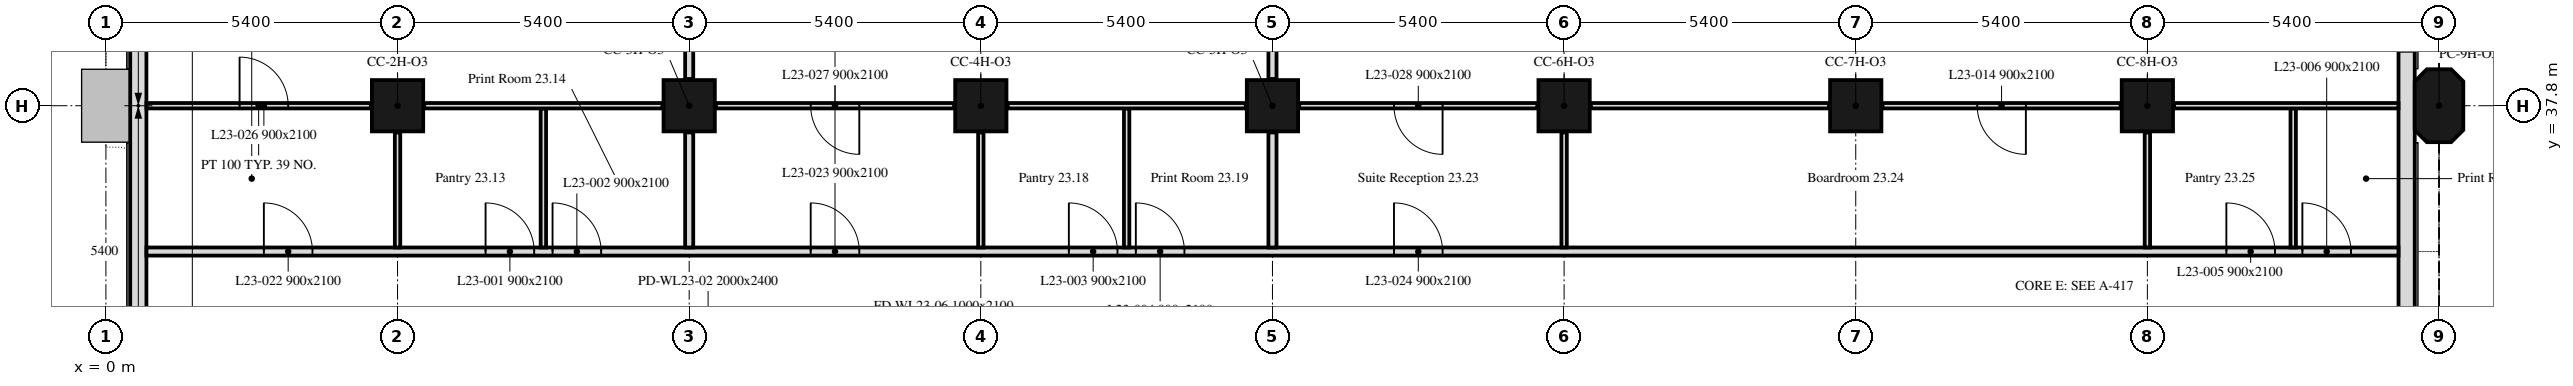
"""IFC4 building model, lengths in metres.
Left out: names, types, materials, properties, quantities, classifications, styles, units other than length and angle.
Written with IfcOpenShell. Run it as: python <this file> out.ifc"""

import sys

from ifc_helpers import new_model, si_unit, direction, frame, frame_2d, origin, origin_2d, place, context, subcontext, project, spatial, polyline, rectangle, outline, extrude, element, fill, save


model = new_model("IFC4")
c1 = context("Model", 3, precision=1e-05, world=origin(), true_north=direction((0.0, 1.0)))
c2 = subcontext(c1, "Body", "Model", "MODEL_VIEW")
j1 = project(units=[si_unit("LENGTHUNIT", "METRE"), si_unit("PLANEANGLEUNIT", "RADIAN")], contexts=[c1])
p1 = place(None, origin())
s1 = spatial("IfcSite", under=j1, at=p1, CompositionType="ELEMENT")
p2 = place(p1, origin())
s2 = spatial("IfcBuilding", under=s1, at=p2, CompositionType="ELEMENT")
p3 = place(p2, frame((0.0, 0.0, 99.2)))
s3 = spatial("IfcBuildingStorey", under=s2, at=p3, CompositionType="ELEMENT", Elevation=99.2)
for number, where, z_axis, x_axis in (
    (1, (5.4, 37.8, 0.0), (0.0, 0.0, 1.0), (1.0, 0.0, 0.0)),
    (2, (10.8, 37.8, 0.0), (0.0, 0.0, 1.0), (1.0, 0.0, 0.0)),
    (3, (16.2, 37.8, 0.0), (0.0, 0.0, 1.0), (1.0, 0.0, 0.0)),
    (4, (21.6, 37.8, 0.0), (0.0, 0.0, 1.0), (1.0, 0.0, 0.0)),
    (5, (27.0, 37.8, 0.0), (0.0, 0.0, 1.0), (1.0, 0.0, 0.0)),
    (6, (32.4, 37.8, 0.0), (0.0, 0.0, 1.0), (1.0, 0.0, 0.0)),
    (7, (37.8, 37.8, 0.0), (0.0, 0.0, 1.0), (1.0, 0.0, 0.0)),
):
    element("IfcColumn", number, at=place(p3, frame(where, z_axis=z_axis, x_axis=x_axis)), inside=s3, PredefinedType="COLUMN", context=c2, shape_type="SweptSolid", body=[
        extrude(rectangle(XDim=0.95, YDim=0.95, at=origin_2d()), origin(), (0.0, 0.0, 1.0), 3.5),
    ])
p4 = place(p3, frame((43.2, 37.8, 0.0), z_axis=(0.0, 0.0, 1.0), x_axis=(0.0, 1.0, 0.0)))
e8 = element("IfcColumn", 8, at=p4, inside=s3, PredefinedType="COLUMN", context=c2, shape_type="SweptSolid", body=[
    extrude(outline(polyline([(-0.45, -0.45), (0.45, -0.45), (0.675, -0.225), (0.675, 0.225), (0.45, 0.45), (-0.45, 0.45), (-0.675, 0.225), (-0.675, -0.225), (-0.45, -0.45)])), origin(), (0.0, 0.0, 1.0), 3.5),
])
p5 = place(p3, frame((42.6, 32.4, 0.0), z_axis=(0.0, 0.0, 1.0), x_axis=(0.0, 1.0, 0.0)))
e9 = element("IfcWall", 9, at=p5, inside=s3, PredefinedType="SOLIDWALL", context=c2, shape_type="SweptSolid", body=[
    extrude(rectangle(XDim=10.614, YDim=0.3, at=frame_2d((5.307, 0.0))), origin(), (0.0, 0.0, 1.0), 3.5),
])
p6 = place(p5, frame((6.4, 0.0, 0.9)))
e10 = element("IfcOpeningElement", 10, at=p6, cuts=e9, PredefinedType="OPENING", context=c2, shape_type="SweptSolid", body=[
    extrude(rectangle(XDim=3.4, YDim=1.7, at=frame_2d((1.7, 0.85))), frame((0.0, 0.16, 0.0), z_axis=(0.0, -1.0, 0.0), x_axis=(1.0, 0.0, 0.0)), (0.0, 0.0, 1.0), 0.32),
])
p7 = place(p3, frame((0.6, 43.014, 0.0), z_axis=(0.0, 0.0, 1.0), x_axis=(0.0, -1.0, 0.0)))
e11 = element("IfcWall", 11, at=p7, inside=s3, PredefinedType="SOLIDWALL", context=c2, shape_type="SweptSolid", body=[
    extrude(rectangle(XDim=32.027, YDim=0.3, at=frame_2d((16.014, 0.0))), origin(), (0.0, 0.0, 1.0), 3.5),
])
p8 = place(p7, frame((28.164, 0.0, 0.9)))
e12 = element("IfcOpeningElement", 12, at=p8, cuts=e11, PredefinedType="OPENING", context=c2, shape_type="SweptSolid", body=[
    extrude(rectangle(XDim=1.1, YDim=1.7, at=frame_2d((0.55, 0.85))), frame((0.0, 0.16, 0.0), z_axis=(0.0, -1.0, 0.0), x_axis=(1.0, 0.0, 0.0)), (0.0, 0.0, 1.0), 0.32),
])
p9 = place(p7, frame((29.764, 0.0, 0.9)))
e13 = element("IfcOpeningElement", 13, at=p9, cuts=e11, PredefinedType="OPENING", context=c2, shape_type="SweptSolid", body=[
    extrude(rectangle(XDim=1.1, YDim=1.7, at=frame_2d((0.55, 0.85))), frame((0.0, 0.16, 0.0), z_axis=(0.0, -1.0, 0.0), x_axis=(1.0, 0.0, 0.0)), (0.0, 0.0, 1.0), 0.32),
])
p10 = place(p3, frame((0.751, 35.1, 0.0), z_axis=(0.0, 0.0, 1.0), x_axis=(1.0, 0.0, 0.0)))
e14 = element("IfcWall", 14, at=p10, inside=s3, PredefinedType="PARTITIONING", context=c2, shape_type="SweptSolid", body=[
    extrude(rectangle(XDim=41.698, YDim=0.15, at=frame_2d((20.849, 0.0))), origin(), (0.0, 0.0, 1.0), 2.75),
])
p11 = place(p10, frame((6.279, 0.0, 0.0)))
e15 = element("IfcOpeningElement", 15, at=p11, cuts=e14, PredefinedType="OPENING", context=c2, shape_type="SweptSolid", body=[
    extrude(rectangle(XDim=0.9, YDim=2.1, at=frame_2d((0.45, 1.05))), frame((0.0, 0.075, 0.0), z_axis=(0.0, -1.0, 0.0), x_axis=(1.0, 0.0, 0.0)), (0.0, 0.0, 1.0), 0.15),
])
p12 = place(p10, frame((7.519, 0.0, 0.0)))
e16 = element("IfcOpeningElement", 16, at=p12, cuts=e14, PredefinedType="OPENING", context=c2, shape_type="SweptSolid", body=[
    extrude(rectangle(XDim=0.9, YDim=2.1, at=frame_2d((0.45, 1.05))), frame((0.0, 0.075, 0.0), z_axis=(0.0, -1.0, 0.0), x_axis=(1.0, 0.0, 0.0)), (0.0, 0.0, 1.0), 0.15),
])
p13 = place(p10, frame((17.079, 0.0, 0.0)))
e17 = element("IfcOpeningElement", 17, at=p13, cuts=e14, PredefinedType="OPENING", context=c2, shape_type="SweptSolid", body=[
    extrude(rectangle(XDim=0.9, YDim=2.1, at=frame_2d((0.45, 1.05))), frame((0.0, 0.075, 0.0), z_axis=(0.0, -1.0, 0.0), x_axis=(1.0, 0.0, 0.0)), (0.0, 0.0, 1.0), 0.15),
])
p14 = place(p10, frame((18.319, 0.0, 0.0)))
e18 = element("IfcOpeningElement", 18, at=p14, cuts=e14, PredefinedType="OPENING", context=c2, shape_type="SweptSolid", body=[
    extrude(rectangle(XDim=0.9, YDim=2.1, at=frame_2d((0.45, 1.05))), frame((0.0, 0.075, 0.0), z_axis=(0.0, -1.0, 0.0), x_axis=(1.0, 0.0, 0.0)), (0.0, 0.0, 1.0), 0.15),
])
p15 = place(p10, frame((38.511, 0.0, 0.0)))
e19 = element("IfcOpeningElement", 19, at=p15, cuts=e14, PredefinedType="OPENING", context=c2, shape_type="SweptSolid", body=[
    extrude(rectangle(XDim=0.9, YDim=2.1, at=frame_2d((0.45, 1.05))), frame((0.0, 0.075, 0.0), z_axis=(0.0, -1.0, 0.0), x_axis=(1.0, 0.0, 0.0)), (0.0, 0.0, 1.0), 0.15),
])
p16 = place(p10, frame((39.919, 0.0, 0.0)))
e20 = element("IfcOpeningElement", 20, at=p16, cuts=e14, PredefinedType="OPENING", context=c2, shape_type="SweptSolid", body=[
    extrude(rectangle(XDim=0.9, YDim=2.1, at=frame_2d((0.45, 1.05))), frame((0.0, 0.075, 0.0), z_axis=(0.0, -1.0, 0.0), x_axis=(1.0, 0.0, 0.0)), (0.0, 0.0, 1.0), 0.15),
])
p17 = place(p10, frame((2.174, 0.0, 0.0)))
e21 = element("IfcOpeningElement", 21, at=p17, cuts=e14, PredefinedType="OPENING", context=c2, shape_type="SweptSolid", body=[
    extrude(rectangle(XDim=0.9, YDim=2.1, at=frame_2d((0.45, 1.05))), frame((0.0, 0.075, 0.0), z_axis=(0.0, -1.0, 0.0), x_axis=(1.0, 0.0, 0.0)), (0.0, 0.0, 1.0), 0.15),
])
p18 = place(p10, frame((12.299, 0.0, 0.0)))
e22 = element("IfcOpeningElement", 22, at=p18, cuts=e14, PredefinedType="OPENING", context=c2, shape_type="SweptSolid", body=[
    extrude(rectangle(XDim=0.9, YDim=2.1, at=frame_2d((0.45, 1.05))), frame((0.0, 0.075, 0.0), z_axis=(0.0, -1.0, 0.0), x_axis=(1.0, 0.0, 0.0)), (0.0, 0.0, 1.0), 0.15),
])
p19 = place(p10, frame((23.099, 0.0, 0.0)))
e23 = element("IfcOpeningElement", 23, at=p19, cuts=e14, PredefinedType="OPENING", context=c2, shape_type="SweptSolid", body=[
    extrude(rectangle(XDim=0.9, YDim=2.1, at=frame_2d((0.45, 1.05))), frame((0.0, 0.075, 0.0), z_axis=(0.0, -1.0, 0.0), x_axis=(1.0, 0.0, 0.0)), (0.0, 0.0, 1.0), 0.15),
])
p20 = place(p3, frame((0.751, 37.8, 0.0), z_axis=(0.0, 0.0, 1.0), x_axis=(1.0, 0.0, 0.0)))
e24 = element("IfcWall", 24, at=p20, inside=s3, PredefinedType="PARTITIONING", context=c2, shape_type="SweptSolid", body=[
    extrude(rectangle(XDim=4.154, YDim=0.1, at=frame_2d((2.077, 0.0))), origin(), (0.0, 0.0, 1.0), 2.75),
])
p21 = place(p20, frame((1.724, 0.0, 0.0)))
e25 = element("IfcOpeningElement", 25, at=p21, cuts=e24, PredefinedType="OPENING", context=c2, shape_type="SweptSolid", body=[
    extrude(rectangle(XDim=0.9, YDim=2.1, at=frame_2d((0.45, 1.05))), frame((0.0, 0.05, 0.0), z_axis=(0.0, -1.0, 0.0), x_axis=(1.0, 0.0, 0.0)), (0.0, 0.0, 1.0), 0.1),
])
p22 = place(p3, frame((5.4, 37.305, 0.0), z_axis=(0.0, 0.0, 1.0), x_axis=(0.0, -1.0, 0.0)))
e26 = element("IfcWall", 26, at=p22, inside=s3, PredefinedType="PARTITIONING", context=c2, shape_type="SweptSolid", body=[
    extrude(rectangle(XDim=2.13, YDim=0.1, at=frame_2d((1.065, 0.0))), origin(), (0.0, 0.0, 1.0), 3.5),
])
p23 = place(p3, frame((8.1, 35.175, 0.0), z_axis=(0.0, 0.0, 1.0), x_axis=(0.0, 1.0, 0.0)))
e27 = element("IfcWall", 27, at=p23, inside=s3, PredefinedType="PARTITIONING", context=c2, shape_type="SweptSolid", body=[
    extrude(rectangle(XDim=2.575, YDim=0.1, at=frame_2d((1.288, 0.0))), origin(), (0.0, 0.0, 1.0), 3.5),
])
p24 = place(p3, frame((10.8, 35.175, 0.0), z_axis=(0.0, 0.0, 1.0), x_axis=(0.0, 1.0, 0.0)))
e28 = element("IfcWall", 28, at=p24, inside=s3, PredefinedType="PARTITIONING", context=c2, shape_type="SweptSolid", body=[
    extrude(rectangle(XDim=2.13, YDim=0.15, at=frame_2d((1.065, 0.0))), origin(), (0.0, 0.0, 1.0), 2.75),
])
p25 = place(p3, frame((10.305, 37.8, 0.0), z_axis=(0.0, 0.0, 1.0), x_axis=(-1.0, 0.0, 0.0)))
e29 = element("IfcWall", 29, at=p25, inside=s3, PredefinedType="PARTITIONING", context=c2, shape_type="SweptSolid", body=[
    extrude(rectangle(XDim=4.41, YDim=0.1, at=frame_2d((2.205, 0.0))), origin(), (0.0, 0.0, 1.0), 2.75),
])
p26 = place(p3, frame((10.8, 38.295, 0.0), z_axis=(0.0, 0.0, 1.0), x_axis=(0.0, 1.0, 0.0)))
e30 = element("IfcWall", 30, at=p26, inside=s3, PredefinedType="PARTITIONING", context=c2, shape_type="SweptSolid", body=[
    extrude(rectangle(XDim=4.41, YDim=0.15, at=frame_2d((2.205, 0.0))), origin(), (0.0, 0.0, 1.0), 2.75),
])
p27 = place(p3, frame((16.2, 35.175, 0.0), z_axis=(0.0, 0.0, 1.0), x_axis=(0.0, 1.0, 0.0)))
e31 = element("IfcWall", 31, at=p27, inside=s3, PredefinedType="PARTITIONING", context=c2, shape_type="SweptSolid", body=[
    extrude(rectangle(XDim=2.13, YDim=0.1, at=frame_2d((1.065, 0.0))), origin(), (0.0, 0.0, 1.0), 2.75),
])
p28 = place(p3, frame((15.705, 37.8, 0.0), z_axis=(0.0, 0.0, 1.0), x_axis=(-1.0, 0.0, 0.0)))
e32 = element("IfcWall", 32, at=p28, inside=s3, PredefinedType="PARTITIONING", context=c2, shape_type="SweptSolid", body=[
    extrude(rectangle(XDim=4.41, YDim=0.1, at=frame_2d((2.205, 0.0))), origin(), (0.0, 0.0, 1.0), 2.75),
])
p29 = place(p28, frame((1.755, 0.0, 0.0)))
e33 = element("IfcOpeningElement", 33, at=p29, cuts=e32, PredefinedType="OPENING", context=c2, shape_type="SweptSolid", body=[
    extrude(rectangle(XDim=0.9, YDim=2.1, at=frame_2d((0.45, 1.05))), frame((0.0, 0.05, 0.0), z_axis=(0.0, -1.0, 0.0), x_axis=(1.0, 0.0, 0.0)), (0.0, 0.0, 1.0), 0.1),
])
p30 = place(p3, frame((18.9, 35.175, 0.0), z_axis=(0.0, 0.0, 1.0), x_axis=(0.0, 1.0, 0.0)))
e34 = element("IfcWall", 34, at=p30, inside=s3, PredefinedType="PARTITIONING", context=c2, shape_type="SweptSolid", body=[
    extrude(rectangle(XDim=2.575, YDim=0.1, at=frame_2d((1.288, 0.0))), origin(), (0.0, 0.0, 1.0), 3.5),
])
p31 = place(p3, frame((21.6, 35.175, 0.0), z_axis=(0.0, 0.0, 1.0), x_axis=(0.0, 1.0, 0.0)))
e35 = element("IfcWall", 35, at=p31, inside=s3, PredefinedType="PARTITIONING", context=c2, shape_type="SweptSolid", body=[
    extrude(rectangle(XDim=2.13, YDim=0.15, at=frame_2d((1.065, 0.0))), origin(), (0.0, 0.0, 1.0), 2.75),
])
p32 = place(p3, frame((21.105, 37.8, 0.0), z_axis=(0.0, 0.0, 1.0), x_axis=(-1.0, 0.0, 0.0)))
e36 = element("IfcWall", 36, at=p32, inside=s3, PredefinedType="PARTITIONING", context=c2, shape_type="SweptSolid", body=[
    extrude(rectangle(XDim=4.41, YDim=0.1, at=frame_2d((2.205, 0.0))), origin(), (0.0, 0.0, 1.0), 3.5),
])
p33 = place(p3, frame((21.6, 38.295, 0.0), z_axis=(0.0, 0.0, 1.0), x_axis=(0.0, 1.0, 0.0)))
e37 = element("IfcWall", 37, at=p33, inside=s3, PredefinedType="PARTITIONING", context=c2, shape_type="SweptSolid", body=[
    extrude(rectangle(XDim=4.41, YDim=0.15, at=frame_2d((2.205, 0.0))), origin(), (0.0, 0.0, 1.0), 2.75),
])
p34 = place(p3, frame((27.0, 35.175, 0.0), z_axis=(0.0, 0.0, 1.0), x_axis=(0.0, 1.0, 0.0)))
e38 = element("IfcWall", 38, at=p34, inside=s3, PredefinedType="PARTITIONING", context=c2, shape_type="SweptSolid", body=[
    extrude(rectangle(XDim=2.13, YDim=0.1, at=frame_2d((1.065, 0.0))), origin(), (0.0, 0.0, 1.0), 2.75),
])
p35 = place(p3, frame((26.505, 37.8, 0.0), z_axis=(0.0, 0.0, 1.0), x_axis=(-1.0, 0.0, 0.0)))
e39 = element("IfcWall", 39, at=p35, inside=s3, PredefinedType="PARTITIONING", context=c2, shape_type="SweptSolid", body=[
    extrude(rectangle(XDim=4.41, YDim=0.1, at=frame_2d((2.205, 0.0))), origin(), (0.0, 0.0, 1.0), 3.5),
])
p36 = place(p35, frame((1.755, 0.0, 0.0)))
e40 = element("IfcOpeningElement", 40, at=p36, cuts=e39, PredefinedType="OPENING", context=c2, shape_type="SweptSolid", body=[
    extrude(rectangle(XDim=0.9, YDim=2.1, at=frame_2d((0.45, 1.05))), frame((0.0, 0.05, 0.0), z_axis=(0.0, -1.0, 0.0), x_axis=(1.0, 0.0, 0.0)), (0.0, 0.0, 1.0), 0.1),
])
p37 = place(p3, frame((37.8, 35.175, 0.0), z_axis=(0.0, 0.0, 1.0), x_axis=(0.0, 1.0, 0.0)))
e41 = element("IfcWall", 41, at=p37, inside=s3, PredefinedType="PARTITIONING", context=c2, shape_type="SweptSolid", body=[
    extrude(rectangle(XDim=2.13, YDim=0.1, at=frame_2d((1.065, 0.0))), origin(), (0.0, 0.0, 1.0), 3.5),
])
p38 = place(p3, frame((37.305, 37.8, 0.0), z_axis=(0.0, 0.0, 1.0), x_axis=(-1.0, 0.0, 0.0)))
e42 = element("IfcWall", 42, at=p38, inside=s3, PredefinedType="PARTITIONING", context=c2, shape_type="SweptSolid", body=[
    extrude(rectangle(XDim=4.41, YDim=0.1, at=frame_2d((2.205, 0.0))), origin(), (0.0, 0.0, 1.0), 3.5),
])
p39 = place(p38, frame((1.755, 0.0, 0.0)))
e43 = element("IfcOpeningElement", 43, at=p39, cuts=e42, PredefinedType="OPENING", context=c2, shape_type="SweptSolid", body=[
    extrude(rectangle(XDim=0.9, YDim=2.1, at=frame_2d((0.45, 1.05))), frame((0.0, 0.05, 0.0), z_axis=(0.0, -1.0, 0.0), x_axis=(1.0, 0.0, 0.0)), (0.0, 0.0, 1.0), 0.1),
])
p40 = place(p3, frame((31.905, 37.8, 0.0), z_axis=(0.0, 0.0, 1.0), x_axis=(-1.0, 0.0, 0.0)))
e44 = element("IfcWall", 44, at=p40, inside=s3, PredefinedType="PARTITIONING", context=c2, shape_type="SweptSolid", body=[
    extrude(rectangle(XDim=4.41, YDim=0.1, at=frame_2d((2.205, 0.0))), origin(), (0.0, 0.0, 1.0), 3.5),
])
p41 = place(p3, frame((40.5, 35.175, 0.0), z_axis=(0.0, 0.0, 1.0), x_axis=(0.0, 1.0, 0.0)))
e45 = element("IfcWall", 45, at=p41, inside=s3, PredefinedType="PARTITIONING", context=c2, shape_type="SweptSolid", body=[
    extrude(rectangle(XDim=2.575, YDim=0.1, at=frame_2d((1.288, 0.0))), origin(), (0.0, 0.0, 1.0), 3.5),
])
p42 = place(p3, frame((42.449, 37.8, 0.0), z_axis=(0.0, 0.0, 1.0), x_axis=(-1.0, 0.0, 0.0)))
e46 = element("IfcWall", 46, at=p42, inside=s3, PredefinedType="PARTITIONING", context=c2, shape_type="SweptSolid", body=[
    extrude(rectangle(XDim=4.154, YDim=0.1, at=frame_2d((2.077, 0.0))), origin(), (0.0, 0.0, 1.0), 3.5),
])
p43 = place(p6, origin())
e47 = element("IfcWindow", 47, at=p43, inside=s3, PartitioningType="SINGLE_PANEL", PredefinedType="WINDOW", context=c2, shape_type="SweptSolid", body=[
    extrude(rectangle(XDim=3.4, YDim=1.7, at=frame_2d((1.7, 0.85))), frame((0.0, 0.03, 0.0), z_axis=(0.0, -1.0, 0.0), x_axis=(1.0, 0.0, 0.0)), (0.0, 0.0, 1.0), 0.06),
])
fill(e10, e47)
p44 = place(p11, origin())
e48 = element("IfcDoor", 48, at=p44, inside=s3, OperationType="SINGLE_SWING_LEFT", PredefinedType="DOOR", context=c2, shape_type="SweptSolid", body=[
    extrude(rectangle(XDim=0.9, YDim=2.1, at=frame_2d((0.45, 1.05))), frame((0.0, 0.025, 0.0), z_axis=(0.0, -1.0, 0.0), x_axis=(1.0, 0.0, 0.0)), (0.0, 0.0, 1.0), 0.05),
])
fill(e15, e48)
p45 = place(p12, origin())
e49 = element("IfcDoor", 49, at=p45, inside=s3, OperationType="SINGLE_SWING_LEFT", PredefinedType="DOOR", context=c2, shape_type="SweptSolid", body=[
    extrude(rectangle(XDim=0.9, YDim=2.1, at=frame_2d((0.45, 1.05))), frame((0.0, 0.025, 0.0), z_axis=(0.0, -1.0, 0.0), x_axis=(1.0, 0.0, 0.0)), (0.0, 0.0, 1.0), 0.05),
])
fill(e16, e49)
p46 = place(p13, origin())
e50 = element("IfcDoor", 50, at=p46, inside=s3, OperationType="SINGLE_SWING_LEFT", PredefinedType="DOOR", context=c2, shape_type="SweptSolid", body=[
    extrude(rectangle(XDim=0.9, YDim=2.1, at=frame_2d((0.45, 1.05))), frame((0.0, 0.025, 0.0), z_axis=(0.0, -1.0, 0.0), x_axis=(1.0, 0.0, 0.0)), (0.0, 0.0, 1.0), 0.05),
])
fill(e17, e50)
p47 = place(p14, origin())
e51 = element("IfcDoor", 51, at=p47, inside=s3, OperationType="SINGLE_SWING_LEFT", PredefinedType="DOOR", context=c2, shape_type="SweptSolid", body=[
    extrude(rectangle(XDim=0.9, YDim=2.1, at=frame_2d((0.45, 1.05))), frame((0.0, 0.025, 0.0), z_axis=(0.0, -1.0, 0.0), x_axis=(1.0, 0.0, 0.0)), (0.0, 0.0, 1.0), 0.05),
])
fill(e18, e51)
p48 = place(p15, origin())
e52 = element("IfcDoor", 52, at=p48, inside=s3, OperationType="SINGLE_SWING_LEFT", PredefinedType="DOOR", context=c2, shape_type="SweptSolid", body=[
    extrude(rectangle(XDim=0.9, YDim=2.1, at=frame_2d((0.45, 1.05))), frame((0.0, 0.025, 0.0), z_axis=(0.0, -1.0, 0.0), x_axis=(1.0, 0.0, 0.0)), (0.0, 0.0, 1.0), 0.05),
])
fill(e19, e52)
p49 = place(p16, origin())
e53 = element("IfcDoor", 53, at=p49, inside=s3, OperationType="SINGLE_SWING_LEFT", PredefinedType="DOOR", context=c2, shape_type="SweptSolid", body=[
    extrude(rectangle(XDim=0.9, YDim=2.1, at=frame_2d((0.45, 1.05))), frame((0.0, 0.025, 0.0), z_axis=(0.0, -1.0, 0.0), x_axis=(1.0, 0.0, 0.0)), (0.0, 0.0, 1.0), 0.05),
])
fill(e20, e53)
p50 = place(p39, origin())
e54 = element("IfcDoor", 54, at=p50, inside=s3, OperationType="SINGLE_SWING_LEFT", PredefinedType="DOOR", context=c2, shape_type="SweptSolid", body=[
    extrude(rectangle(XDim=0.9, YDim=2.1, at=frame_2d((0.45, 1.05))), frame((0.0, 0.025, 0.0), z_axis=(0.0, -1.0, 0.0), x_axis=(1.0, 0.0, 0.0)), (0.0, 0.0, 1.0), 0.05),
])
fill(e43, e54)
p51 = place(p17, origin())
e55 = element("IfcDoor", 55, at=p51, inside=s3, OperationType="SINGLE_SWING_LEFT", PredefinedType="DOOR", context=c2, shape_type="SweptSolid", body=[
    extrude(rectangle(XDim=0.9, YDim=2.1, at=frame_2d((0.45, 1.05))), frame((0.0, 0.025, 0.0), z_axis=(0.0, -1.0, 0.0), x_axis=(1.0, 0.0, 0.0)), (0.0, 0.0, 1.0), 0.05),
])
fill(e21, e55)
p52 = place(p18, origin())
e56 = element("IfcDoor", 56, at=p52, inside=s3, OperationType="SINGLE_SWING_LEFT", PredefinedType="DOOR", context=c2, shape_type="SweptSolid", body=[
    extrude(rectangle(XDim=0.9, YDim=2.1, at=frame_2d((0.45, 1.05))), frame((0.0, 0.025, 0.0), z_axis=(0.0, -1.0, 0.0), x_axis=(1.0, 0.0, 0.0)), (0.0, 0.0, 1.0), 0.05),
])
fill(e22, e56)
p53 = place(p19, origin())
e57 = element("IfcDoor", 57, at=p53, inside=s3, OperationType="SINGLE_SWING_LEFT", PredefinedType="DOOR", context=c2, shape_type="SweptSolid", body=[
    extrude(rectangle(XDim=0.9, YDim=2.1, at=frame_2d((0.45, 1.05))), frame((0.0, 0.025, 0.0), z_axis=(0.0, -1.0, 0.0), x_axis=(1.0, 0.0, 0.0)), (0.0, 0.0, 1.0), 0.05),
])
fill(e23, e57)
p54 = place(p21, origin())
e58 = element("IfcDoor", 58, at=p54, inside=s3, OperationType="SINGLE_SWING_RIGHT", PredefinedType="DOOR", context=c2, shape_type="SweptSolid", body=[
    extrude(rectangle(XDim=0.9, YDim=2.1, at=frame_2d((0.45, 1.05))), frame((0.0, 0.025, 0.0), z_axis=(0.0, -1.0, 0.0), x_axis=(1.0, 0.0, 0.0)), (0.0, 0.0, 1.0), 0.05),
])
fill(e25, e58)
p55 = place(p29, origin())
e59 = element("IfcDoor", 59, at=p55, inside=s3, OperationType="SINGLE_SWING_LEFT", PredefinedType="DOOR", context=c2, shape_type="SweptSolid", body=[
    extrude(rectangle(XDim=0.9, YDim=2.1, at=frame_2d((0.45, 1.05))), frame((0.0, 0.025, 0.0), z_axis=(0.0, -1.0, 0.0), x_axis=(1.0, 0.0, 0.0)), (0.0, 0.0, 1.0), 0.05),
])
fill(e33, e59)
p56 = place(p36, origin())
e60 = element("IfcDoor", 60, at=p56, inside=s3, OperationType="SINGLE_SWING_RIGHT", PredefinedType="DOOR", context=c2, shape_type="SweptSolid", body=[
    extrude(rectangle(XDim=0.9, YDim=2.1, at=frame_2d((0.45, 1.05))), frame((0.0, 0.025, 0.0), z_axis=(0.0, -1.0, 0.0), x_axis=(1.0, 0.0, 0.0)), (0.0, 0.0, 1.0), 0.05),
])
fill(e40, e60)
save(model, sys.argv[1])
